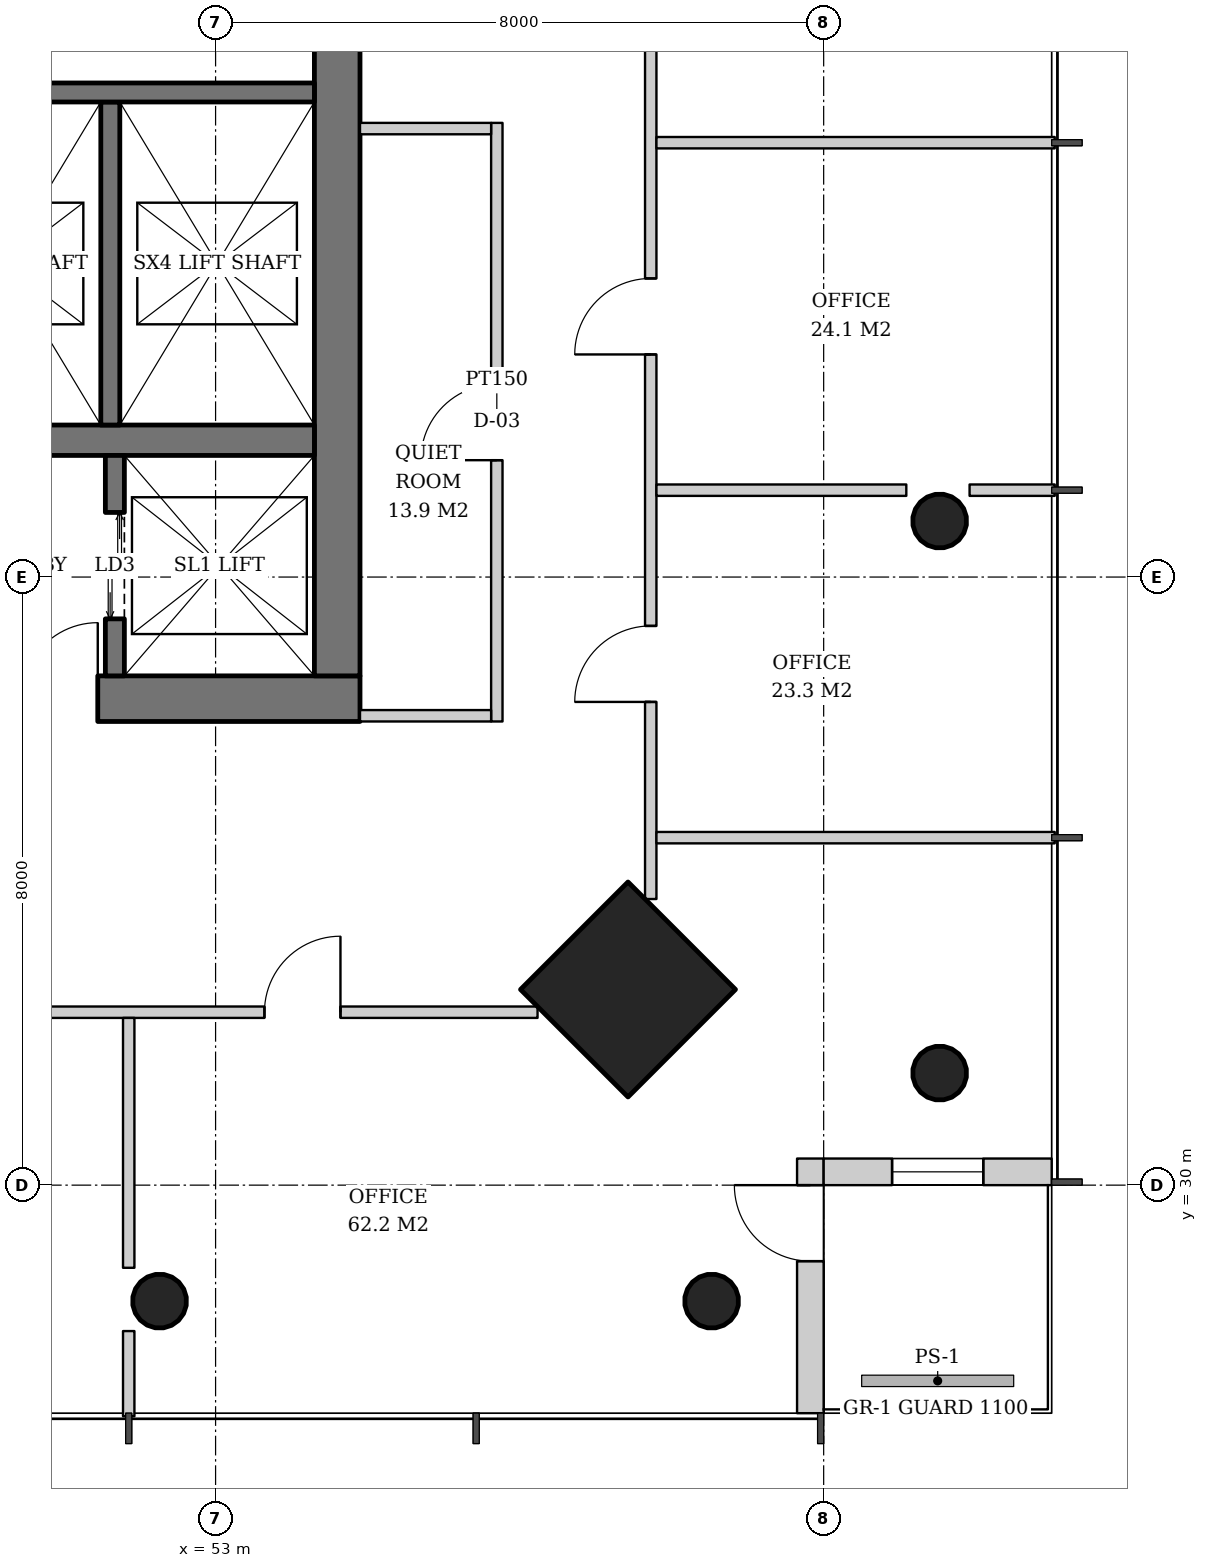
"""IFC4 building model, lengths in metres.
Left out: names, types, materials, properties, quantities, classifications, styles, units other than length and angle.
Written with IfcOpenShell. Run it as: python <this file> out.ifc"""

import sys

from ifc_helpers import new_model, si_unit, direction, frame, frame_2d, origin, origin_2d, place, context, subcontext, project, spatial, rectangle, hollow_circle, extrude, element, fill, save


model = new_model("IFC4")
c1 = context("Model", 3, precision=1e-05, world=origin(), true_north=direction((0.0, 1.0)))
c2 = subcontext(c1, "Body", "Model", "MODEL_VIEW")
j1 = project(units=[si_unit("LENGTHUNIT", "METRE"), si_unit("PLANEANGLEUNIT", "RADIAN")], contexts=[c1])
p1 = place(None, origin())
s1 = spatial("IfcSite", under=j1, at=p1, CompositionType="ELEMENT")
p2 = place(p1, origin())
s2 = spatial("IfcBuilding", under=s1, at=p2, CompositionType="ELEMENT")
p3 = place(p2, frame((0.0, 0.0, 222.4)))
s3 = spatial("IfcBuildingStorey", under=s2, at=p3, CompositionType="ELEMENT", Elevation=222.4)
p4 = place(p3, frame((62.564, 31.436, 0.0), z_axis=(-0.031898107953, 0.031898107953, 0.998981992539), x_axis=(-0.707106781187, -0.707106781187, 0.0)))
e1 = element("IfcColumn", 1, at=p4, inside=s3, PredefinedType="COLUMN", context=c2, shape_type="SweptSolid", body=[
    extrude(hollow_circle(Radius=0.355, WallThickness=0.025, at=origin_2d()), origin(), (0.0, 0.0, 1.0), 3.804),
])
p5 = place(p3, frame((62.564, 38.718, 0.0), z_axis=(-0.031910269556, 0.015987237665, 0.999362868496), x_axis=(-0.447933021895, -0.894067115991, 0.0)))
e2 = element("IfcColumn", 2, at=p5, inside=s3, PredefinedType="COLUMN", context=c2, shape_type="SweptSolid", body=[
    extrude(hollow_circle(Radius=0.355, WallThickness=0.025, at=origin_2d()), origin(), (0.0, 0.0, 1.0), 3.802),
])
p6 = place(p3, frame((58.464, 32.536, 0.0), z_axis=(-0.031962158256, 0.031962158256, 0.998977898093), x_axis=(-0.707106781187, -0.707106781187, 0.0)))
e3 = element("IfcColumn", 3, at=p6, inside=s3, PredefinedType="COLUMN", context=c2, shape_type="SweptSolid", body=[
    extrude(rectangle(XDim=2.0, YDim=2.0, at=origin_2d()), origin(), (0.0, 0.0, 1.0), 3.804),
])
p7 = place(p3, frame((59.564, 28.436, 0.0), z_axis=(-0.031898107953, 0.031898107953, 0.998981992539), x_axis=(-0.707106781187, -0.707106781187, 0.0)))
e4 = element("IfcColumn", 4, at=p7, inside=s3, PredefinedType="COLUMN", context=c2, shape_type="SweptSolid", body=[
    extrude(hollow_circle(Radius=0.355, WallThickness=0.025, at=origin_2d()), origin(), (0.0, 0.0, 1.0), 3.804),
])
p8 = place(p3, frame((52.282, 28.436, 0.0), z_axis=(-0.015987237665, 0.031910269556, 0.999362868496), x_axis=(-0.894067115991, -0.447933021895, 0.0)))
e5 = element("IfcColumn", 5, at=p8, inside=s3, PredefinedType="COLUMN", context=c2, shape_type="SweptSolid", body=[
    extrude(hollow_circle(Radius=0.355, WallThickness=0.025, at=origin_2d()), origin(), (0.0, 0.0, 1.0), 3.802),
])
p9 = place(p3, frame((35.1, 36.4, 0.0), z_axis=(0.0, 0.0, 1.0), x_axis=(1.0, 0.0, 0.0)))
e6 = element("IfcWall", 6, at=p9, inside=s3, PredefinedType="SHEAR", context=c2, shape_type="SweptSolid", body=[
    extrude(rectangle(XDim=19.8, YDim=0.6, at=frame_2d((9.9, 0.0))), origin(), (0.0, 0.0, 1.0), 3.8),
])
p10 = place(p9, frame((3.9, 0.0, 0.0)))
e7 = element("IfcOpeningElement", 7, at=p10, cuts=e6, PredefinedType="OPENING", context=c2, shape_type="SweptSolid", body=[
    extrude(rectangle(XDim=1.0, YDim=2.1, at=frame_2d((0.5, 1.05))), frame((0.0, 0.31, 0.0), z_axis=(0.0, -1.0, 0.0), x_axis=(1.0, 0.0, 0.0)), (0.0, 0.0, 1.0), 0.62),
])
p11 = place(p9, frame((15.35, 0.0, 0.0)))
e8 = element("IfcOpeningElement", 8, at=p11, cuts=e6, PredefinedType="OPENING", context=c2, shape_type="SweptSolid", body=[
    extrude(rectangle(XDim=1.0, YDim=2.1, at=frame_2d((0.5, 1.05))), frame((0.0, 0.31, 0.0), z_axis=(0.0, -1.0, 0.0), x_axis=(1.0, 0.0, 0.0)), (0.0, 0.0, 1.0), 0.62),
])
p12 = place(p3, frame((54.6, 36.7, 0.0), z_axis=(0.0, 0.0, 1.0), x_axis=(0.0, 1.0, 0.0)))
e9 = element("IfcWall", 9, at=p12, inside=s3, PredefinedType="SHEAR", context=c2, shape_type="SweptSolid", body=[
    extrude(rectangle(XDim=18.6, YDim=0.6, at=frame_2d((9.3, 0.0))), origin(), (0.0, 0.0, 1.0), 3.8),
])
p13 = place(p12, frame((8.4, 0.0, 0.0)))
e10 = element("IfcOpeningElement", 10, at=p13, cuts=e9, PredefinedType="OPENING", context=c2, shape_type="SweptSolid", body=[
    extrude(rectangle(XDim=1.8, YDim=2.4, at=frame_2d((0.9, 1.2))), frame((0.0, 0.31, 0.0), z_axis=(0.0, -1.0, 0.0), x_axis=(1.0, 0.0, 0.0)), (0.0, 0.0, 1.0), 0.62),
])
p14 = place(p3, frame((35.7, 39.8, 0.0), z_axis=(0.0, 0.0, 1.0), x_axis=(1.0, 0.0, 0.0)))
e11 = element("IfcWall", 11, at=p14, inside=s3, PredefinedType="SHEAR", context=c2, shape_type="SweptSolid", body=[
    extrude(rectangle(XDim=18.6, YDim=0.4, at=frame_2d((9.3, 0.0))), origin(), (0.0, 0.0, 1.0), 3.8),
])
p15 = place(p3, frame((60.825, 27.0, 0.0), z_axis=(0.0, 0.0, 1.0), x_axis=(0.0, 1.0, 0.0)))
e12 = element("IfcWall", 12, at=p15, inside=s3, PredefinedType="SOLIDWALL", context=c2, shape_type="SweptSolid", body=[
    extrude(rectangle(XDim=3.35, YDim=0.35, at=frame_2d((1.675, 0.0))), origin(), (0.0, 0.0, 1.0), 3.52),
])
p16 = place(p15, frame((2.0, 0.0, 0.0)))
e13 = element("IfcOpeningElement", 13, at=p16, cuts=e12, PredefinedType="OPENING", context=c2, shape_type="SweptSolid", body=[
    extrude(rectangle(XDim=1.0, YDim=2.4, at=frame_2d((0.5, 1.2))), frame((0.0, 0.185, 0.0), z_axis=(0.0, -1.0, 0.0), x_axis=(1.0, 0.0, 0.0)), (0.0, 0.0, 1.0), 0.37),
])
p17 = place(p3, frame((61.0, 30.175, 0.0), z_axis=(0.0, 0.0, 1.0), x_axis=(1.0, 0.0, 0.0)))
e14 = element("IfcWall", 14, at=p17, inside=s3, PredefinedType="SOLIDWALL", context=c2, shape_type="SweptSolid", body=[
    extrude(rectangle(XDim=3.0, YDim=0.35, at=frame_2d((1.5, 0.0))), origin(), (0.0, 0.0, 1.0), 3.52),
])
p18 = place(p17, frame((0.9, 0.0, 0.6)))
e15 = element("IfcOpeningElement", 15, at=p18, cuts=e14, PredefinedType="OPENING", context=c2, shape_type="SweptSolid", body=[
    extrude(rectangle(XDim=1.2, YDim=2.55, at=frame_2d((0.6, 1.275))), frame((0.0, 0.185, 0.0), z_axis=(0.0, -1.0, 0.0), x_axis=(1.0, 0.0, 0.0)), (0.0, 0.0, 1.0), 0.37),
])
p19 = place(p3, frame((51.675, 36.7, 0.0), z_axis=(0.0, 0.0, 1.0), x_axis=(0.0, 1.0, 0.0)))
e16 = element("IfcWall", 16, at=p19, inside=s3, PredefinedType="SHEAR", context=c2, shape_type="SweptSolid", body=[
    extrude(rectangle(XDim=2.9, YDim=0.25, at=frame_2d((1.45, 0.0))), origin(), (0.0, 0.0, 1.0), 3.8),
])
p20 = place(p19, frame((0.75, 0.0, 0.0)))
e17 = element("IfcOpeningElement", 17, at=p20, cuts=e16, PredefinedType="OPENING", context=c2, shape_type="SweptSolid", body=[
    extrude(rectangle(XDim=1.4, YDim=2.4, at=frame_2d((0.7, 1.2))), frame((0.0, 0.135, 0.0), z_axis=(0.0, -1.0, 0.0), x_axis=(1.0, 0.0, 0.0)), (0.0, 0.0, 1.0), 0.27),
])
p21 = place(p3, frame((51.615, 44.25, 0.0), z_axis=(0.0, 0.0, 1.0), x_axis=(0.0, -1.0, 0.0)))
e18 = element("IfcWall", 18, at=p21, inside=s3, PredefinedType="SHEAR", context=c2, shape_type="SweptSolid", body=[
    extrude(rectangle(XDim=4.25, YDim=0.25, at=frame_2d((2.125, 0.0))), origin(), (0.0, 0.0, 1.0), 3.8),
])
p22 = place(p3, frame((48.93, 44.375, 0.0), z_axis=(0.0, 0.0, 1.0), x_axis=(1.0, 0.0, 0.0)))
e19 = element("IfcWall", 19, at=p22, inside=s3, PredefinedType="SHEAR", context=c2, shape_type="SweptSolid", body=[
    extrude(rectangle(XDim=5.37, YDim=0.25, at=frame_2d((2.685, 0.0))), origin(), (0.0, 0.0, 1.0), 3.8),
])
p23 = place(p3, frame((56.7, 36.1, 0.0), z_axis=(0.0, 0.0, 1.0), x_axis=(0.0, 1.0, 0.0)))
e20 = element("IfcWall", 20, at=p23, inside=s3, PredefinedType="PARTITIONING", context=c2, shape_type="SweptSolid", body=[
    extrude(rectangle(XDim=7.875, YDim=0.15, at=frame_2d((3.938, 0.0))), origin(), (0.0, 0.0, 1.0), 2.706),
])
p24 = place(p23, frame((3.438, 0.0, 0.0)))
e21 = element("IfcOpeningElement", 21, at=p24, cuts=e20, PredefinedType="OPENING", context=c2, shape_type="SweptSolid", body=[
    extrude(rectangle(XDim=1.0, YDim=2.1, at=frame_2d((0.5, 1.05))), frame((0.0, 0.085, 0.0), z_axis=(0.0, -1.0, 0.0), x_axis=(1.0, 0.0, 0.0)), (0.0, 0.0, 1.0), 0.17),
])
p25 = place(p3, frame((54.9, 36.175, 0.0), z_axis=(0.0, 0.0, 1.0), x_axis=(1.0, 0.0, 0.0)))
e22 = element("IfcWall", 22, at=p25, inside=s3, PredefinedType="PARTITIONING", context=c2, shape_type="SweptSolid", body=[
    extrude(rectangle(XDim=1.725, YDim=0.15, at=frame_2d((0.863, 0.0))), origin(), (0.0, 0.0, 1.0), 2.92),
])
p26 = place(p3, frame((54.9, 43.9, 0.0), z_axis=(0.0, 0.0, 1.0), x_axis=(1.0, 0.0, 0.0)))
e23 = element("IfcWall", 23, at=p26, inside=s3, PredefinedType="PARTITIONING", context=c2, shape_type="SweptSolid", body=[
    extrude(rectangle(XDim=1.725, YDim=0.15, at=frame_2d((0.863, 0.0))), origin(), (0.0, 0.0, 1.0), 3.52),
])
p27 = place(p3, frame((58.725, 33.764, 0.0), z_axis=(0.0, 0.0, 1.0), x_axis=(0.0, 1.0, 0.0)))
e24 = element("IfcWall", 24, at=p27, inside=s3, PredefinedType="PARTITIONING", context=c2, shape_type="SweptSolid", body=[
    extrude(rectangle(XDim=24.472, YDim=0.15, at=frame_2d((12.236, 0.0))), origin(), (0.0, 0.0, 1.0), 2.706),
])
p28 = place(p27, frame((2.593, 0.0, 0.0)))
e25 = element("IfcOpeningElement", 25, at=p28, cuts=e24, PredefinedType="OPENING", context=c2, shape_type="SweptSolid", body=[
    extrude(rectangle(XDim=1.0, YDim=2.1, at=frame_2d((0.5, 1.05))), frame((0.0, 0.085, 0.0), z_axis=(0.0, -1.0, 0.0), x_axis=(1.0, 0.0, 0.0)), (0.0, 0.0, 1.0), 0.17),
])
p29 = place(p27, frame((7.164, 0.0, 0.0)))
e26 = element("IfcOpeningElement", 26, at=p29, cuts=e24, PredefinedType="OPENING", context=c2, shape_type="SweptSolid", body=[
    extrude(rectangle(XDim=1.0, YDim=2.1, at=frame_2d((0.5, 1.05))), frame((0.0, 0.085, 0.0), z_axis=(0.0, -1.0, 0.0), x_axis=(1.0, 0.0, 0.0)), (0.0, 0.0, 1.0), 0.17),
])
p30 = place(p27, frame((11.736, 0.0, 0.0)))
e27 = element("IfcOpeningElement", 27, at=p30, cuts=e24, PredefinedType="OPENING", context=c2, shape_type="SweptSolid", body=[
    extrude(rectangle(XDim=1.0, YDim=2.1, at=frame_2d((0.5, 1.05))), frame((0.0, 0.085, 0.0), z_axis=(0.0, -1.0, 0.0), x_axis=(1.0, 0.0, 0.0)), (0.0, 0.0, 1.0), 0.17),
])
p31 = place(p27, frame((20.879, 0.0, 0.0)))
e28 = element("IfcOpeningElement", 28, at=p31, cuts=e24, PredefinedType="OPENING", context=c2, shape_type="SweptSolid", body=[
    extrude(rectangle(XDim=1.0, YDim=2.1, at=frame_2d((0.5, 1.05))), frame((0.0, 0.085, 0.0), z_axis=(0.0, -1.0, 0.0), x_axis=(1.0, 0.0, 0.0)), (0.0, 0.0, 1.0), 0.17),
])
p32 = place(p3, frame((58.8, 34.572, 0.0), z_axis=(0.0, 0.0, 1.0), x_axis=(1.0, 0.0, 0.0)))
e29 = element("IfcWall", 29, at=p32, inside=s3, PredefinedType="PARTITIONING", context=c2, shape_type="SweptSolid", body=[
    extrude(rectangle(XDim=5.24, YDim=0.15, at=frame_2d((2.62, 0.0))), origin(), (0.0, 0.0, 1.0), 3.52),
])
p33 = place(p3, frame((58.8, 39.143, 0.0), z_axis=(0.0, 0.0, 1.0), x_axis=(1.0, 0.0, 0.0)))
e30 = element("IfcWall", 30, at=p33, inside=s3, PredefinedType="PARTITIONING", context=c2, shape_type="SweptSolid", body=[
    extrude(rectangle(XDim=3.287, YDim=0.15, at=frame_2d((1.644, 0.0))), origin(), (0.0, 0.0, 1.0), 3.52),
])
p34 = place(p3, frame((62.92, 39.143, 0.0), z_axis=(0.0, 0.0, 1.0), x_axis=(1.0, 0.0, 0.0)))
e31 = element("IfcWall", 31, at=p34, inside=s3, PredefinedType="PARTITIONING", context=c2, shape_type="SweptSolid", body=[
    extrude(rectangle(XDim=1.12, YDim=0.15, at=frame_2d((0.56, 0.0))), origin(), (0.0, 0.0, 1.0), 3.52),
])
p35 = place(p3, frame((58.8, 43.714, 0.0), z_axis=(0.0, 0.0, 1.0), x_axis=(1.0, 0.0, 0.0)))
e32 = element("IfcWall", 32, at=p35, inside=s3, PredefinedType="PARTITIONING", context=c2, shape_type="SweptSolid", body=[
    extrude(rectangle(XDim=5.24, YDim=0.15, at=frame_2d((2.62, 0.0))), origin(), (0.0, 0.0, 1.0), 3.52),
])
p36 = place(p3, frame((32.764, 32.275, 0.0), z_axis=(0.0, 0.0, 1.0), x_axis=(1.0, 0.0, 0.0)))
e33 = element("IfcWall", 33, at=p36, inside=s3, PredefinedType="PARTITIONING", context=c2, shape_type="SweptSolid", body=[
    extrude(rectangle(XDim=24.472, YDim=0.15, at=frame_2d((12.236, 0.0))), origin(), (0.0, 0.0, 1.0), 2.706),
])
p37 = place(p36, frame((2.593, 0.0, 0.0)))
e34 = element("IfcOpeningElement", 34, at=p37, cuts=e33, PredefinedType="OPENING", context=c2, shape_type="SweptSolid", body=[
    extrude(rectangle(XDim=1.0, YDim=2.1, at=frame_2d((0.5, 1.05))), frame((0.0, 0.085, 0.0), z_axis=(0.0, -1.0, 0.0), x_axis=(1.0, 0.0, 0.0)), (0.0, 0.0, 1.0), 0.17),
])
p38 = place(p36, frame((7.164, 0.0, 0.0)))
e35 = element("IfcOpeningElement", 35, at=p38, cuts=e33, PredefinedType="OPENING", context=c2, shape_type="SweptSolid", body=[
    extrude(rectangle(XDim=1.0, YDim=2.1, at=frame_2d((0.5, 1.05))), frame((0.0, 0.085, 0.0), z_axis=(0.0, -1.0, 0.0), x_axis=(1.0, 0.0, 0.0)), (0.0, 0.0, 1.0), 0.17),
])
p39 = place(p36, frame((11.336, 0.0, 0.0)))
e36 = element("IfcOpeningElement", 36, at=p39, cuts=e33, PredefinedType="OPENING", context=c2, shape_type="SweptSolid", body=[
    extrude(rectangle(XDim=1.8, YDim=2.4, at=frame_2d((0.9, 1.2))), frame((0.0, 0.085, 0.0), z_axis=(0.0, -1.0, 0.0), x_axis=(1.0, 0.0, 0.0)), (0.0, 0.0, 1.0), 0.17),
])
p40 = place(p36, frame((20.879, 0.0, 0.0)))
e37 = element("IfcOpeningElement", 37, at=p40, cuts=e33, PredefinedType="OPENING", context=c2, shape_type="SweptSolid", body=[
    extrude(rectangle(XDim=1.0, YDim=2.1, at=frame_2d((0.5, 1.05))), frame((0.0, 0.085, 0.0), z_axis=(0.0, -1.0, 0.0), x_axis=(1.0, 0.0, 0.0)), (0.0, 0.0, 1.0), 0.17),
])
p41 = place(p3, frame((51.857, 32.2, 0.0), z_axis=(0.0, 0.0, 1.0), x_axis=(0.0, -1.0, 0.0)))
e38 = element("IfcWall", 38, at=p41, inside=s3, PredefinedType="PARTITIONING", context=c2, shape_type="SweptSolid", body=[
    extrude(rectangle(XDim=3.287, YDim=0.15, at=frame_2d((1.644, 0.0))), origin(), (0.0, 0.0, 1.0), 3.52),
])
p42 = place(p3, frame((51.857, 28.08, 0.0), z_axis=(0.0, 0.0, 1.0), x_axis=(0.0, -1.0, 0.0)))
e39 = element("IfcWall", 39, at=p42, inside=s3, PredefinedType="PARTITIONING", context=c2, shape_type="SweptSolid", body=[
    extrude(rectangle(XDim=1.12, YDim=0.15, at=frame_2d((0.56, 0.0))), origin(), (0.0, 0.0, 1.0), 3.52),
])
p43 = place(p16, origin())
e40 = element("IfcDoor", 40, at=p43, inside=s3, OperationType="SINGLE_SWING_RIGHT", PredefinedType="DOOR", context=c2, shape_type="SweptSolid", body=[
    extrude(rectangle(XDim=1.0, YDim=2.4, at=frame_2d((0.5, 1.2))), frame((0.0, 0.025, 0.0), z_axis=(0.0, -1.0, 0.0), x_axis=(1.0, 0.0, 0.0)), (0.0, 0.0, 1.0), 0.05),
])
fill(e13, e40)
p44 = place(p18, origin())
e41 = element("IfcWindow", 41, at=p44, inside=s3, PartitioningType="SINGLE_PANEL", PredefinedType="WINDOW", context=c2, shape_type="SweptSolid", body=[
    extrude(rectangle(XDim=1.2, YDim=2.55, at=frame_2d((0.6, 1.275))), frame((0.0, 0.03, 0.0), z_axis=(0.0, -1.0, 0.0), x_axis=(1.0, 0.0, 0.0)), (0.0, 0.0, 1.0), 0.06),
])
fill(e15, e41)
p45 = place(p20, origin())
e42 = element("IfcDoor", 42, at=p45, inside=s3, OperationType="DOUBLE_DOOR_SLIDING", PredefinedType="DOOR", context=c2, shape_type="SweptSolid", body=[
    extrude(rectangle(XDim=1.4, YDim=2.4, at=frame_2d((0.7, 1.2))), frame((0.0, 0.025, 0.0), z_axis=(0.0, -1.0, 0.0), x_axis=(1.0, 0.0, 0.0)), (0.0, 0.0, 1.0), 0.05),
])
fill(e17, e42)
p46 = place(p11, origin())
e43 = element("IfcDoor", 43, at=p46, inside=s3, OperationType="SINGLE_SWING_RIGHT", PredefinedType="DOOR", context=c2, shape_type="SweptSolid", body=[
    extrude(rectangle(XDim=1.0, YDim=2.1, at=frame_2d((0.5, 1.05))), frame((0.0, 0.025, 0.0), z_axis=(0.0, -1.0, 0.0), x_axis=(1.0, 0.0, 0.0)), (0.0, 0.0, 1.0), 0.05),
])
fill(e8, e43)
p47 = place(p24, origin())
e44 = element("IfcDoor", 44, at=p47, inside=s3, OperationType="SINGLE_SWING_LEFT", PredefinedType="DOOR", context=c2, shape_type="SweptSolid", body=[
    extrude(rectangle(XDim=1.0, YDim=2.1, at=frame_2d((0.5, 1.05))), frame((0.0, 0.025, 0.0), z_axis=(0.0, -1.0, 0.0), x_axis=(1.0, 0.0, 0.0)), (0.0, 0.0, 1.0), 0.05),
])
fill(e21, e44)
p48 = place(p28, origin())
e45 = element("IfcDoor", 45, at=p48, inside=s3, OperationType="SINGLE_SWING_LEFT", PredefinedType="DOOR", context=c2, shape_type="SweptSolid", body=[
    extrude(rectangle(XDim=1.0, YDim=2.1, at=frame_2d((0.5, 1.05))), frame((0.0, 0.025, 0.0), z_axis=(0.0, -1.0, 0.0), x_axis=(1.0, 0.0, 0.0)), (0.0, 0.0, 1.0), 0.05),
])
fill(e25, e45)
p49 = place(p29, origin())
e46 = element("IfcDoor", 46, at=p49, inside=s3, OperationType="SINGLE_SWING_LEFT", PredefinedType="DOOR", context=c2, shape_type="SweptSolid", body=[
    extrude(rectangle(XDim=1.0, YDim=2.1, at=frame_2d((0.5, 1.05))), frame((0.0, 0.025, 0.0), z_axis=(0.0, -1.0, 0.0), x_axis=(1.0, 0.0, 0.0)), (0.0, 0.0, 1.0), 0.05),
])
fill(e26, e46)
p50 = place(p40, origin())
e47 = element("IfcDoor", 47, at=p50, inside=s3, OperationType="SINGLE_SWING_RIGHT", PredefinedType="DOOR", context=c2, shape_type="SweptSolid", body=[
    extrude(rectangle(XDim=1.0, YDim=2.1, at=frame_2d((0.5, 1.05))), frame((0.0, 0.025, 0.0), z_axis=(0.0, -1.0, 0.0), x_axis=(1.0, 0.0, 0.0)), (0.0, 0.0, 1.0), 0.05),
])
fill(e37, e47)
save(model, sys.argv[1])
